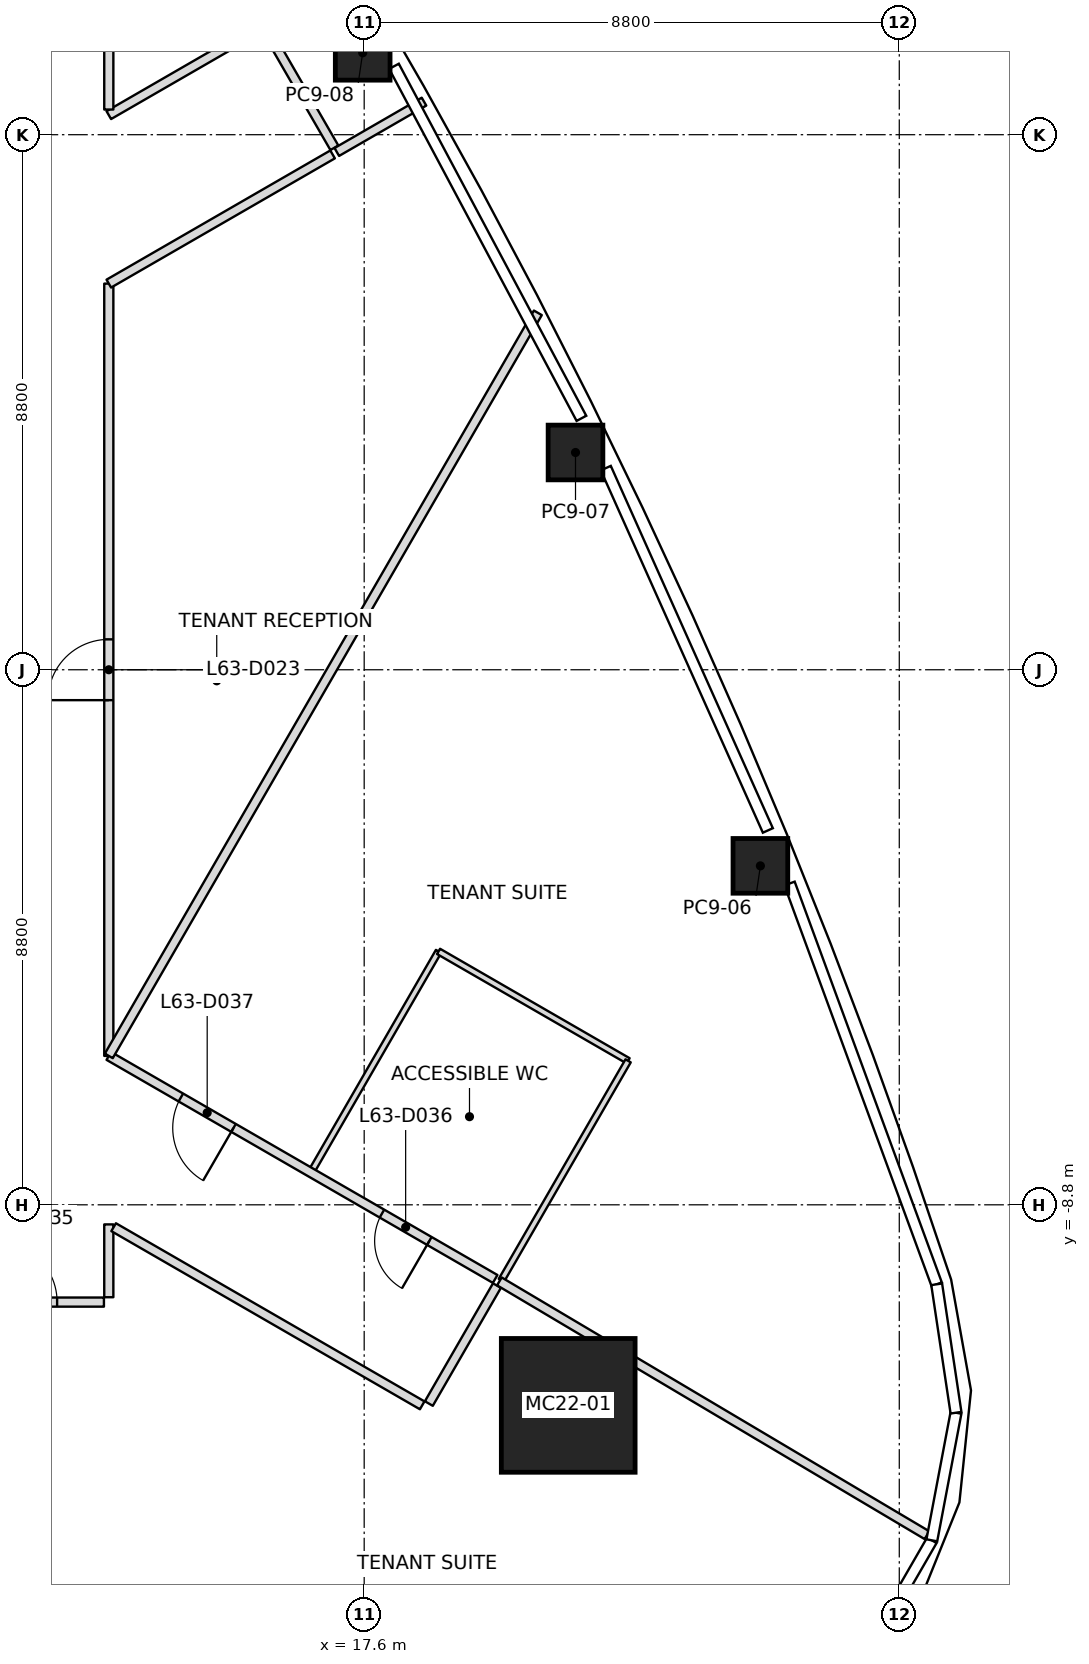
"""IFC4 building model, lengths in metres.
Left out: names, types, materials, properties, quantities, classifications, styles, units other than length and angle.
Written with IfcOpenShell. Run it as: python <this file> out.ifc"""

import sys

from ifc_helpers import new_model, si_unit, direction, frame, frame_2d, origin, origin_2d, place, context, subcontext, project, spatial, rectangle, extrude, element, fill, save


model = new_model("IFC4")
c1 = context("Model", 3, precision=1e-05, world=origin(), true_north=direction((0.0, 1.0)))
c2 = subcontext(c1, "Body", "Model", "MODEL_VIEW")
j1 = project(units=[si_unit("LENGTHUNIT", "METRE"), si_unit("PLANEANGLEUNIT", "RADIAN")], contexts=[c1])
p1 = place(None, origin())
s1 = spatial("IfcSite", under=j1, at=p1, CompositionType="ELEMENT")
p2 = place(p1, origin())
s2 = spatial("IfcBuilding", under=s1, at=p2, CompositionType="ELEMENT")
p3 = place(p2, frame((0.0, 0.0, 279.0)))
s3 = spatial("IfcBuildingStorey", under=s2, at=p3, CompositionType="ELEMENT", Elevation=279.0)
p4 = place(p3, frame((20.956, -12.099, 0.0), z_axis=(-0.027817676907, 0.016043967164, 0.999484250986), x_axis=(0.999613013546, 0.000446478676, 0.027814093645)))
e1 = element("IfcColumn", 1, at=p4, inside=s3, PredefinedType="COLUMN", context=c2, shape_type="SweptSolid", body=[
    extrude(rectangle(XDim=2.2, YDim=2.2, at=origin_2d()), origin(), (0.0, 0.0, 1.0), 4.002),
])
p5 = place(p3, frame((24.116, -3.225, 0.0), z_axis=(-0.017696547774, 0.0099466803, 0.999793926641), x_axis=(-0.37661478628, 0.926233823829, -0.015881005939)))
e2 = element("IfcColumn", 2, at=p5, inside=s3, PredefinedType="COLUMN", context=c2, shape_type="SweptSolid", body=[
    extrude(rectangle(XDim=0.9, YDim=0.9, at=origin_2d()), origin(), (0.0, 0.0, 1.0), 4.001),
])
p6 = place(p3, frame((21.075, 3.573, 0.0), z_axis=(-0.014036674448, 0.002013957638, 0.999899452818), x_axis=(-0.439329981248, 0.898290343146, -0.00797665265)))
e3 = element("IfcColumn", 3, at=p6, inside=s3, PredefinedType="COLUMN", context=c2, shape_type="SweptSolid", body=[
    extrude(rectangle(XDim=0.9, YDim=0.9, at=origin_2d()), origin(), (0.0, 0.0, 1.0), 4.0),
])
p7 = place(p3, frame((17.575, 10.147, 0.0), z_axis=(-0.009887049298, -0.00573692984, 0.999934664812), x_axis=(-0.499975560967, 0.866039512843, 2.5126546e-05)))
e4 = element("IfcColumn", 4, at=p7, inside=s3, PredefinedType="COLUMN", context=c2, shape_type="SweptSolid", body=[
    extrude(rectangle(XDim=0.9, YDim=0.9, at=origin_2d()), origin(), (0.0, 0.0, 1.0), 4.0),
])
p8 = place(p3, frame((20.456, 5.871, 0.0), z_axis=(0.0, 0.0, 1.0), x_axis=(-0.500005486798, -0.866022235957, 0.0)))
e5 = element("IfcWall", 5, at=p8, inside=s3, PredefinedType="PARTITIONING", context=c2, shape_type="SweptSolid", body=[
    extrude(rectangle(XDim=14.112, YDim=0.15, at=frame_2d((7.056, 0.0))), origin(), (0.0, 0.0, 1.0), 3.234),
])
p9 = place(p3, frame((17.15, 8.516, 0.0), z_axis=(0.0, 0.0, 1.0), x_axis=(0.865984256307, 0.50007126275, 0.0)))
e6 = element("IfcWall", 6, at=p9, inside=s3, PredefinedType="PARTITIONING", context=c2, shape_type="SweptSolid", body=[
    extrude(rectangle(XDim=1.656, YDim=0.15, at=frame_2d((0.828, 0.0))), origin(), (0.0, 0.0, 1.0), 3.234),
])
p10 = place(p3, frame((19.823, -10.059, 0.0), z_axis=(0.0, 0.0, 1.0), x_axis=(0.8599042964, -0.510455287986, 0.0)))
e7 = element("IfcWall", 7, at=p10, inside=s3, PredefinedType="PARTITIONING", context=c2, shape_type="SweptSolid", body=[
    extrude(rectangle(XDim=8.178, YDim=0.15, at=frame_2d((4.089, 0.0))), origin(), (0.0, 0.0, 1.0), 3.234),
])
p11 = place(p3, frame((1.2, -10.4, 0.0), z_axis=(0.0, 0.0, 1.0), x_axis=(1.0, 0.0, 0.0)))
e8 = element("IfcWall", 8, at=p11, inside=s3, PredefinedType="PARTITIONING", context=c2, shape_type="SweptSolid", body=[
    extrude(rectangle(XDim=12.12, YDim=0.15, at=frame_2d((6.06, 0.0))), origin(), (0.0, 0.0, 1.0), 3.317),
])
p12 = place(p11, frame((6.85, 0.0, 0.0)))
e9 = element("IfcOpeningElement", 9, at=p12, cuts=e8, PredefinedType="OPENING", context=c2, shape_type="SweptSolid", body=[
    extrude(rectangle(XDim=0.9, YDim=2.1, at=frame_2d((0.45, 1.05))), frame((0.0, 0.075, 0.0), z_axis=(0.0, -1.0, 0.0), x_axis=(1.0, 0.0, 0.0)), (0.0, 0.0, 1.0), 0.15),
])
p13 = place(p11, frame((10.35, 0.0, 0.0)))
e10 = element("IfcOpeningElement", 10, at=p13, cuts=e8, PredefinedType="OPENING", context=c2, shape_type="SweptSolid", body=[
    extrude(rectangle(XDim=1.0, YDim=2.1, at=frame_2d((0.5, 1.05))), frame((0.0, 0.075, 0.0), z_axis=(0.0, -1.0, 0.0), x_axis=(1.0, 0.0, 0.0)), (0.0, 0.0, 1.0), 0.15),
])
p14 = place(p3, frame((13.4, -10.32, 0.0), z_axis=(0.0, 0.0, 1.0), x_axis=(0.0, 1.0, 0.0)))
e11 = element("IfcWall", 11, at=p14, inside=s3, PredefinedType="PARTITIONING", context=c2, shape_type="SweptSolid", body=[
    extrude(rectangle(XDim=1.198, YDim=0.15, at=frame_2d((0.599, 0.0))), origin(), (0.0, 0.0, 1.0), 3.233),
])
p15 = place(p3, frame((13.479, -9.168, 0.0), z_axis=(0.0, 0.0, 1.0), x_axis=(0.866032259827, -0.499988124798, 0.0)))
e12 = element("IfcWall", 12, at=p15, inside=s3, PredefinedType="PARTITIONING", context=c2, shape_type="SweptSolid", body=[
    extrude(rectangle(XDim=5.86, YDim=0.15, at=frame_2d((2.93, 0.0))), origin(), (0.0, 0.0, 1.0), 3.233),
])
p16 = place(p3, frame((13.4, -6.351, 0.0), z_axis=(0.0, 0.0, 1.0), x_axis=(0.0, 1.0, 0.0)))
e13 = element("IfcWall", 13, at=p16, inside=s3, PredefinedType="PARTITIONING", context=c2, shape_type="SweptSolid", body=[
    extrude(rectangle(XDim=12.702, YDim=0.15, at=frame_2d((6.351, 0.0))), origin(), (0.0, 0.0, 1.0), 3.317),
])
p17 = place(p16, frame((5.851, 0.0, 0.0)))
e14 = element("IfcOpeningElement", 14, at=p17, cuts=e13, PredefinedType="OPENING", context=c2, shape_type="SweptSolid", body=[
    extrude(rectangle(XDim=1.0, YDim=2.1, at=frame_2d((0.5, 1.05))), frame((0.0, 0.075, 0.0), z_axis=(0.0, -1.0, 0.0), x_axis=(1.0, 0.0, 0.0)), (0.0, 0.0, 1.0), 0.15),
])
p18 = place(p3, frame((13.4, 6.351, 0.0), z_axis=(0.0, 0.0, 1.0), x_axis=(0.866039217307, 0.499976073514, 0.0)))
e15 = element("IfcWall", 15, at=p18, inside=s3, PredefinedType="PARTITIONING", context=c2, shape_type="SweptSolid", body=[
    extrude(rectangle(XDim=4.25, YDim=0.15, at=frame_2d((2.125, 0.0))), origin(), (0.0, 0.0, 1.0), 3.45),
])
p19 = place(p3, frame((19.754, -10.019, 0.0), z_axis=(0.0, 0.0, 1.0), x_axis=(-0.866035423939, 0.499982644181, 0.0)))
e16 = element("IfcWall", 16, at=p19, inside=s3, PredefinedType="PARTITIONING", context=c2, shape_type="SweptSolid", body=[
    extrude(rectangle(XDim=7.337, YDim=0.15, at=frame_2d((3.668, 0.0))), origin(), (0.0, 0.0, 1.0), 3.317),
])
p20 = place(p19, frame((1.25, 0.0, 0.0)))
e17 = element("IfcOpeningElement", 17, at=p20, cuts=e16, PredefinedType="OPENING", context=c2, shape_type="SweptSolid", body=[
    extrude(rectangle(XDim=0.9, YDim=2.1, at=frame_2d((0.45, 1.05))), frame((0.0, 0.075, 0.0), z_axis=(0.0, -1.0, 0.0), x_axis=(1.0, 0.0, 0.0)), (0.0, 0.0, 1.0), 0.15),
])
p21 = place(p19, frame((4.969, 0.0, 0.0)))
e18 = element("IfcOpeningElement", 18, at=p21, cuts=e16, PredefinedType="OPENING", context=c2, shape_type="SweptSolid", body=[
    extrude(rectangle(XDim=1.0, YDim=2.1, at=frame_2d((0.5, 1.05))), frame((0.0, 0.075, 0.0), z_axis=(0.0, -1.0, 0.0), x_axis=(1.0, 0.0, 0.0)), (0.0, 0.0, 1.0), 0.15),
])
p22 = place(p3, frame((15.88, 10.554, 0.0), z_axis=(0.0, 0.0, 1.0), x_axis=(-0.866020927947, -0.500007752297, 0.0)))
e19 = element("IfcWall", 19, at=p22, inside=s3, PredefinedType="PARTITIONING", context=c2, shape_type="SweptSolid", body=[
    extrude(rectangle(XDim=2.864, YDim=0.15, at=frame_2d((1.432, 0.0))), origin(), (0.0, 0.0, 1.0), 3.45),
])
p23 = place(p3, frame((13.4, 9.214, 0.0), z_axis=(0.0, 0.0, 1.0), x_axis=(0.0, 1.0, 0.0)))
e20 = element("IfcWall", 20, at=p23, inside=s3, PredefinedType="PARTITIONING", context=c2, shape_type="SweptSolid", body=[
    extrude(rectangle(XDim=1.106, YDim=0.15, at=frame_2d((0.553, 0.0))), origin(), (0.0, 0.0, 1.0), 3.45),
])
p24 = place(p3, frame((17.11, 8.585, 0.0), z_axis=(0.0, 0.0, 1.0), x_axis=(-0.49994888933, 0.866054910533, 0.0)))
e21 = element("IfcWall", 21, at=p24, inside=s3, PredefinedType="PARTITIONING", context=c2, shape_type="SweptSolid", body=[
    extrude(rectangle(XDim=2.24, YDim=0.15, at=frame_2d((1.12, 0.0))), origin(), (0.0, 0.0, 1.0), 3.45),
])
p25 = place(p3, frame((18.663, -12.069, 0.0), z_axis=(0.0, 0.0, 1.0), x_axis=(0.500030632641, 0.866007717299, 0.0)))
e22 = element("IfcWall", 22, at=p25, inside=s3, PredefinedType="PARTITIONING", context=c2, shape_type="SweptSolid", body=[
    extrude(rectangle(XDim=2.24, YDim=0.15, at=frame_2d((1.12, 0.0))), origin(), (0.0, 0.0, 1.0), 3.233),
])
p26 = place(p3, frame((16.738, -8.243, 0.0), z_axis=(0.0, 0.0, 1.0), x_axis=(0.499992746786, 0.866029591389, 0.0)))
e23 = element("IfcWall", 23, at=p26, inside=s3, PredefinedType="PARTITIONING", context=c2, shape_type="SweptSolid", body=[
    extrude(rectangle(XDim=4.17, YDim=0.1, at=frame_2d((2.085, 0.0))), origin(), (0.0, 0.0, 1.0), 3.45),
])
p27 = place(p3, frame((18.823, -4.632, 0.0), z_axis=(0.0, 0.0, 1.0), x_axis=(0.866018442252, -0.500012057535, 0.0)))
e24 = element("IfcWall", 24, at=p27, inside=s3, PredefinedType="PARTITIONING", context=c2, shape_type="SweptSolid", body=[
    extrude(rectangle(XDim=3.6, YDim=0.1, at=frame_2d((1.8, 0.0))), origin(), (0.0, 0.0, 1.0), 3.443),
])
p28 = place(p3, frame((21.941, -6.432, 0.0), z_axis=(0.0, 0.0, 1.0), x_axis=(-0.499992746786, -0.866029591389, 0.0)))
e25 = element("IfcWall", 25, at=p28, inside=s3, PredefinedType="PARTITIONING", context=c2, shape_type="SweptSolid", body=[
    extrude(rectangle(XDim=4.17, YDim=0.1, at=frame_2d((2.085, 0.0))), origin(), (0.0, 0.0, 1.0), 3.45),
])
p29 = place(p17, origin())
e26 = element("IfcDoor", 26, at=p29, inside=s3, OperationType="SINGLE_SWING_RIGHT", PredefinedType="DOOR", context=c2, shape_type="SweptSolid", body=[
    extrude(rectangle(XDim=1.0, YDim=2.1, at=frame_2d((0.5, 1.05))), frame((0.0, 0.025, 0.0), z_axis=(0.0, -1.0, 0.0), x_axis=(1.0, 0.0, 0.0)), (0.0, 0.0, 1.0), 0.05),
])
fill(e14, e26)
p30 = place(p13, origin())
e27 = element("IfcDoor", 27, at=p30, inside=s3, OperationType="SINGLE_SWING_RIGHT", PredefinedType="DOOR", context=c2, shape_type="SweptSolid", body=[
    extrude(rectangle(XDim=1.0, YDim=2.1, at=frame_2d((0.5, 1.05))), frame((0.0, 0.025, 0.0), z_axis=(0.0, -1.0, 0.0), x_axis=(1.0, 0.0, 0.0)), (0.0, 0.0, 1.0), 0.05),
])
fill(e10, e27)
p31 = place(p20, origin())
e28 = element("IfcDoor", 28, at=p31, inside=s3, OperationType="SINGLE_SWING_LEFT", PredefinedType="DOOR", context=c2, shape_type="SweptSolid", body=[
    extrude(rectangle(XDim=0.9, YDim=2.1, at=frame_2d((0.45, 1.05))), frame((0.0, 0.025, 0.0), z_axis=(0.0, -1.0, 0.0), x_axis=(1.0, 0.0, 0.0)), (0.0, 0.0, 1.0), 0.05),
])
fill(e17, e28)
p32 = place(p21, origin())
e29 = element("IfcDoor", 29, at=p32, inside=s3, OperationType="SINGLE_SWING_RIGHT", PredefinedType="DOOR", context=c2, shape_type="SweptSolid", body=[
    extrude(rectangle(XDim=1.0, YDim=2.1, at=frame_2d((0.5, 1.05))), frame((0.0, 0.025, 0.0), z_axis=(0.0, -1.0, 0.0), x_axis=(1.0, 0.0, 0.0)), (0.0, 0.0, 1.0), 0.05),
])
fill(e18, e29)
save(model, sys.argv[1])
